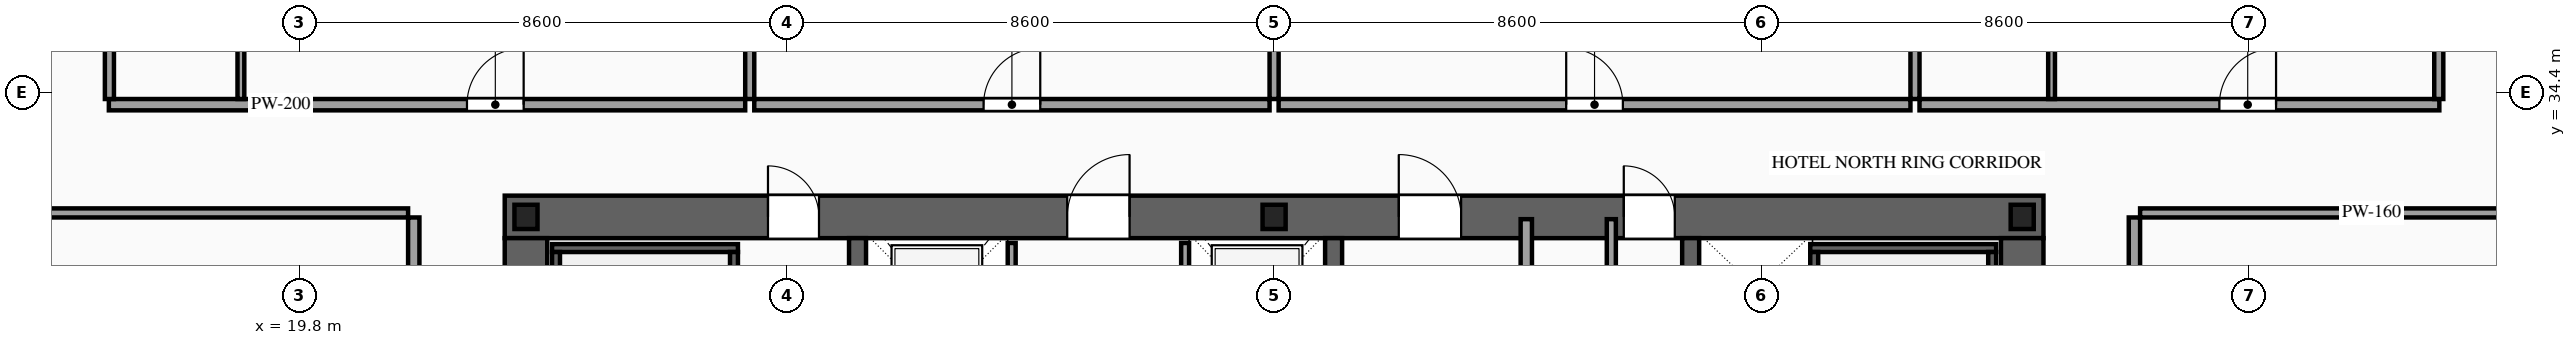
"""IFC4 building model, lengths in metres.
Left out: names, types, materials, properties, quantities, classifications, styles, units other than length and angle.
Written with IfcOpenShell. Run it as: python <this file> out.ifc"""

import sys

from ifc_helpers import new_model, si_unit, direction, frame, frame_2d, origin, origin_2d, place, context, subcontext, project, spatial, rectangle, i_section, extrude, source, transform, mapped, element, fill, save


model = new_model("IFC4")
c1 = context("Model", 3, precision=1e-05, world=origin(), true_north=direction((0.0, 1.0)))
c2 = subcontext(c1, "Body", "Model", "MODEL_VIEW")
j1 = project(units=[si_unit("LENGTHUNIT", "METRE"), si_unit("PLANEANGLEUNIT", "RADIAN")], contexts=[c1])
p1 = place(None, origin())
s1 = spatial("IfcSite", under=j1, at=p1, CompositionType="ELEMENT")
p2 = place(p1, origin())
s2 = spatial("IfcBuilding", under=s1, at=p2, CompositionType="ELEMENT")
p3 = place(p2, frame((0.0, 0.0, 101.0)))
s3 = spatial("IfcBuildingStorey", under=s2, at=p3, CompositionType="ELEMENT", Elevation=101.0)
p4 = place(p3, frame((23.425, 32.2, 0.0), z_axis=(0.0, 0.0, 1.0), x_axis=(1.0, 0.0, 0.0)))
e1 = element("IfcWall", 1, at=p4, inside=s3, PredefinedType="SHEAR", context=c2, shape_type="SweptSolid", body=[
    extrude(rectangle(XDim=27.15, YDim=0.75, at=frame_2d((13.575, 0.0))), origin(), (0.0, 0.0, 1.0), 3.6),
])
p5 = place(p4, frame((4.645, 0.0, 0.0)))
e2 = element("IfcOpeningElement", 2, at=p5, cuts=e1, PredefinedType="OPENING", context=c2, shape_type="SweptSolid", body=[
    extrude(rectangle(XDim=0.9, YDim=2.15, at=frame_2d((0.45, 1.075))), frame((0.0, 0.39, 0.0), z_axis=(0.0, -1.0, 0.0), x_axis=(1.0, 0.0, 0.0)), (0.0, 0.0, 1.0), 0.78),
])
p6 = place(p4, frame((9.925, 0.0, 0.0)))
e3 = element("IfcOpeningElement", 3, at=p6, cuts=e1, PredefinedType="OPENING", context=c2, shape_type="SweptSolid", body=[
    extrude(rectangle(XDim=1.1, YDim=2.2, at=frame_2d((0.55, 1.1))), frame((0.0, 0.39, 0.0), z_axis=(0.0, -1.0, 0.0), x_axis=(1.0, 0.0, 0.0)), (0.0, 0.0, 1.0), 0.78),
])
p7 = place(p4, frame((15.775, 0.0, 0.0)))
e4 = element("IfcOpeningElement", 4, at=p7, cuts=e1, PredefinedType="OPENING", context=c2, shape_type="SweptSolid", body=[
    extrude(rectangle(XDim=1.1, YDim=2.2, at=frame_2d((0.55, 1.1))), frame((0.0, 0.39, 0.0), z_axis=(0.0, -1.0, 0.0), x_axis=(1.0, 0.0, 0.0)), (0.0, 0.0, 1.0), 0.78),
])
p8 = place(p4, frame((19.745, 0.0, 0.0)))
e5 = element("IfcOpeningElement", 5, at=p8, cuts=e1, PredefinedType="OPENING", context=c2, shape_type="SweptSolid", body=[
    extrude(rectangle(XDim=0.9, YDim=2.15, at=frame_2d((0.45, 1.075))), frame((0.0, 0.39, 0.0), z_axis=(0.0, -1.0, 0.0), x_axis=(1.0, 0.0, 0.0)), (0.0, 0.0, 1.0), 0.78),
])
m1 = source(origin(), c2, "Body", "SweptSolid", [
    extrude(rectangle(XDim=12.05, YDim=0.75, at=frame_2d((6.025, 0.0))), origin(), (0.0, 0.0, 1.0), 3.6),
])
for number, where, z_axis, x_axis in (
    (6, (23.8, 19.775, 0.0), (0.0, 0.0, 1.0), (0.0, 1.0, 0.0)),
    (7, (50.2, 19.775, 0.0), (0.0, 0.0, 1.0), (0.0, 1.0, 0.0)),
):
    element("IfcWall", number, at=place(p3, frame(where, z_axis=z_axis, x_axis=x_axis)), inside=s3, PredefinedType="SHEAR", context=c2, shape_type="MappedRepresentation", body=[
        mapped(m1, transform((0.0, 0.0, 0.0), scale=1.0)),
    ])
m2 = source(origin(), c2, "Body", "SweptSolid", [
    extrude(rectangle(XDim=12.05, YDim=0.3, at=frame_2d((6.025, 0.0))), origin(), (0.0, 0.0, 1.0), 3.6),
])
for number, where, z_axis, x_axis in (
    (8, (29.65, 19.775, 0.0), (0.0, 0.0, 1.0), (0.0, 1.0, 0.0)),
    (9, (38.05, 19.775, 0.0), (0.0, 0.0, 1.0), (0.0, 1.0, 0.0)),
    (10, (44.35, 19.775, 0.0), (0.0, 0.0, 1.0), (0.0, 1.0, 0.0)),
):
    element("IfcWall", number, at=place(p3, frame(where, z_axis=z_axis, x_axis=x_axis)), inside=s3, PredefinedType="SOLIDWALL", context=c2, shape_type="MappedRepresentation", body=[
        mapped(m2, transform((0.0, 0.0, 0.0), scale=1.0)),
    ])
m3 = source(origin(), c2, "Body", "SweptSolid", [
    extrude(i_section(OverallWidth=0.407, OverallDepth=0.428, WebThickness=0.02, FlangeThickness=0.035, at=origin_2d()), origin(), (0.0, 0.0, 1.0), 3.6),
])
for number, where, z_axis, x_axis in (
    (11, (23.8, 32.2, 0.0), (0.0, 0.0, 1.0), (1.0, 0.0, 0.0)),
    (12, (37.0, 32.2, 0.0), (0.0, 0.0, 1.0), (1.0, 0.0, 0.0)),
    (13, (50.2, 32.2, 0.0), (0.0, 0.0, 1.0), (1.0, 0.0, 0.0)),
):
    element("IfcColumn", number, at=place(p3, frame(where, z_axis=z_axis, x_axis=x_axis)), inside=s3, PredefinedType="COLUMN", context=c2, shape_type="MappedRepresentation", body=[
        mapped(m3, transform((0.0, 0.0, 0.0), scale=1.0)),
    ])
p9 = place(p3, frame((32.37, 29.4, 0.0), z_axis=(0.0, 0.0, 1.0), x_axis=(0.0, 1.0, 0.0)))
e14 = element("IfcWall", 14, at=p9, inside=s3, PredefinedType="SOLIDWALL", context=c2, shape_type="SweptSolid", body=[
    extrude(rectangle(XDim=2.34, YDim=0.14, at=frame_2d((1.17, 0.0))), origin(), (0.0, 0.0, 1.0), 3.38),
])
p10 = place(p9, frame((0.62, 0.0, 0.0)))
e15 = element("IfcOpeningElement", 15, at=p10, cuts=e14, PredefinedType="OPENING", context=c2, shape_type="SweptSolid", body=[
    extrude(rectangle(XDim=1.1, YDim=2.2, at=frame_2d((0.55, 1.1))), frame((0.0, 0.085, 0.0), z_axis=(0.0, -1.0, 0.0), x_axis=(1.0, 0.0, 0.0)), (0.0, 0.0, 1.0), 0.17),
])
p11 = place(p3, frame((35.43, 29.4, 0.0), z_axis=(0.0, 0.0, 1.0), x_axis=(0.0, 1.0, 0.0)))
e16 = element("IfcWall", 16, at=p11, inside=s3, PredefinedType="SOLIDWALL", context=c2, shape_type="SweptSolid", body=[
    extrude(rectangle(XDim=2.34, YDim=0.14, at=frame_2d((1.17, 0.0))), origin(), (0.0, 0.0, 1.0), 3.38),
])
p12 = place(p11, frame((0.62, 0.0, 0.0)))
e17 = element("IfcOpeningElement", 17, at=p12, cuts=e16, PredefinedType="OPENING", context=c2, shape_type="SweptSolid", body=[
    extrude(rectangle(XDim=1.1, YDim=2.2, at=frame_2d((0.55, 1.1))), frame((0.0, 0.085, 0.0), z_axis=(0.0, -1.0, 0.0), x_axis=(1.0, 0.0, 0.0)), (0.0, 0.0, 1.0), 0.17),
])
m4 = source(origin(), c2, "Body", "SweptSolid", [
    extrude(rectangle(XDim=3.28, YDim=0.14, at=frame_2d((1.64, 0.0))), origin(), (0.0, 0.0, 1.0), 3.38),
])
p13 = place(p3, frame((24.26, 31.65, 0.0), z_axis=(0.0, 0.0, 1.0), x_axis=(1.0, 0.0, 0.0)))
e18 = element("IfcWall", 18, at=p13, inside=s3, PredefinedType="SOLIDWALL", context=c2, shape_type="MappedRepresentation", body=[
    mapped(m4, transform((0.0, 0.0, 0.0), scale=1.0)),
])
m5 = source(origin(), c2, "Body", "SweptSolid", [
    extrude(rectangle(XDim=8.94, YDim=0.14, at=frame_2d((4.47, 0.0))), origin(), (0.0, 0.0, 1.0), 3.38),
])
for number, where, z_axis, x_axis in (
    (19, (24.33, 22.64, 0.0), (0.0, 0.0, 1.0), (0.0, 1.0, 0.0)),
    (20, (27.47, 22.64, 0.0), (0.0, 0.0, 1.0), (0.0, 1.0, 0.0)),
):
    element("IfcWall", number, at=place(p3, frame(where, z_axis=z_axis, x_axis=x_axis)), inside=s3, PredefinedType="SOLIDWALL", context=c2, shape_type="MappedRepresentation", body=[
        mapped(m5, transform((0.0, 0.0, 0.0), scale=1.0)),
    ])
p14 = place(p3, frame((46.46, 31.65, 0.0), z_axis=(0.0, 0.0, 1.0), x_axis=(1.0, 0.0, 0.0)))
e21 = element("IfcWall", 21, at=p14, inside=s3, PredefinedType="SOLIDWALL", context=c2, shape_type="MappedRepresentation", body=[
    mapped(m4, transform((0.0, 0.0, 0.0), scale=1.0)),
])
for number, where, z_axis, x_axis in (
    (22, (46.53, 22.64, 0.0), (0.0, 0.0, 1.0), (0.0, 1.0, 0.0)),
    (23, (49.67, 22.64, 0.0), (0.0, 0.0, 1.0), (0.0, 1.0, 0.0)),
):
    element("IfcWall", number, at=place(p3, frame(where, z_axis=z_axis, x_axis=x_axis)), inside=s3, PredefinedType="SOLIDWALL", context=c2, shape_type="MappedRepresentation", body=[
        mapped(m5, transform((0.0, 0.0, 0.0), scale=1.0)),
    ])
m6 = source(origin(), c2, "Body", "SweptSolid", [
    extrude(rectangle(XDim=12.72, YDim=0.2, at=frame_2d((6.36, 0.0))), origin(), (0.0, 0.0, 1.0), 3.38),
])
p15 = place(p3, frame((41.45, 19.44, 0.0), z_axis=(0.0, 0.0, 1.0), x_axis=(0.0, 1.0, 0.0)))
e24 = element("IfcWall", 24, at=p15, inside=s3, PredefinedType="PARTITIONING", context=c2, shape_type="MappedRepresentation", body=[
    mapped(m6, transform((0.0, 0.0, 0.0), scale=1.0)),
])
m7 = source(origin(), c2, "Body", "SweptSolid", [
    extrude(rectangle(XDim=10.72, YDim=0.16, at=frame_2d((5.36, 0.0))), origin(), (0.0, 0.0, 1.0), 3.38),
])
p16 = place(p3, frame((42.95, 21.44, 0.0), z_axis=(0.0, 0.0, 1.0), x_axis=(0.0, 1.0, 0.0)))
e25 = element("IfcWall", 25, at=p16, inside=s3, PredefinedType="PARTITIONING", context=c2, shape_type="MappedRepresentation", body=[
    mapped(m7, transform((0.0, 0.0, 0.0), scale=1.0)),
])
p17 = place(p3, frame((16.44, 34.18, 0.0), z_axis=(0.0, 0.0, 1.0), x_axis=(1.0, 0.0, 0.0)))
e26 = element("IfcWall", 26, at=p17, inside=s3, PredefinedType="PARTITIONING", context=c2, shape_type="SweptSolid", body=[
    extrude(rectangle(XDim=11.228, YDim=0.2, at=frame_2d((5.614, 0.0))), origin(), (0.0, 0.0, 1.0), 3.38),
])
p18 = place(p17, frame((6.319, 0.0, 0.0)))
e27 = element("IfcOpeningElement", 27, at=p18, cuts=e26, PredefinedType="OPENING", context=c2, shape_type="SweptSolid", body=[
    extrude(rectangle(XDim=1.0, YDim=2.2, at=frame_2d((0.5, 1.1))), frame((0.0, 0.115, 0.0), z_axis=(0.0, -1.0, 0.0), x_axis=(1.0, 0.0, 0.0)), (0.0, 0.0, 1.0), 0.23),
])
m8 = source(origin(), c2, "Body", "SweptSolid", [
    extrude(rectangle(XDim=14.97, YDim=0.16, at=frame_2d((7.485, 0.0))), origin(), (0.0, 0.0, 1.0), 3.38),
])
p19 = place(p3, frame((27.748, 34.28, 0.0), z_axis=(0.0, 0.0, 1.0), x_axis=(0.0, 1.0, 0.0)))
e28 = element("IfcWall", 28, at=p19, inside=s3, PredefinedType="PARTITIONING", context=c2, shape_type="MappedRepresentation", body=[
    mapped(m8, transform((0.0, 0.0, 0.0), scale=1.0)),
])
m9 = source(origin(), c2, "Body", "SweptSolid", [
    extrude(rectangle(XDim=2.42, YDim=0.12, at=frame_2d((1.21, 0.0))), origin(), (0.0, 0.0, 1.0), 3.38),
])
p20 = place(p3, frame((18.77, 34.28, 0.0), z_axis=(0.0, 0.0, 1.0), x_axis=(0.0, 1.0, 0.0)))
e29 = element("IfcWall", 29, at=p20, inside=s3, PredefinedType="PARTITIONING", context=c2, shape_type="MappedRepresentation", body=[
    mapped(m9, transform((0.0, 0.0, 0.0), scale=1.0)),
])
p21 = place(p3, frame((27.828, 34.18, 0.0), z_axis=(0.0, 0.0, 1.0), x_axis=(1.0, 0.0, 0.0)))
e30 = element("IfcWall", 30, at=p21, inside=s3, PredefinedType="PARTITIONING", context=c2, shape_type="SweptSolid", body=[
    extrude(rectangle(XDim=9.092, YDim=0.2, at=frame_2d((4.546, 0.0))), origin(), (0.0, 0.0, 1.0), 3.38),
])
p22 = place(p21, frame((4.046, 0.0, 0.0)))
e31 = element("IfcOpeningElement", 31, at=p22, cuts=e30, PredefinedType="OPENING", context=c2, shape_type="SweptSolid", body=[
    extrude(rectangle(XDim=1.0, YDim=2.2, at=frame_2d((0.5, 1.1))), frame((0.0, 0.115, 0.0), z_axis=(0.0, -1.0, 0.0), x_axis=(1.0, 0.0, 0.0)), (0.0, 0.0, 1.0), 0.23),
])
m10 = source(origin(), c2, "Body", "SweptSolid", [
    extrude(rectangle(XDim=14.97, YDim=0.16, at=frame_2d((7.485, 0.0))), origin(), (0.0, 0.0, 1.0), 2.675),
])
p23 = place(p3, frame((37.0, 34.28, 0.0), z_axis=(0.0, 0.0, 1.0), x_axis=(0.0, 1.0, 0.0)))
e32 = element("IfcWall", 32, at=p23, inside=s3, PredefinedType="PARTITIONING", context=c2, shape_type="MappedRepresentation", body=[
    mapped(m10, transform((0.0, 0.0, 0.0), scale=1.0)),
])
p24 = place(p3, frame((37.08, 34.18, 0.0), z_axis=(0.0, 0.0, 1.0), x_axis=(1.0, 0.0, 0.0)))
e33 = element("IfcWall", 33, at=p24, inside=s3, PredefinedType="PARTITIONING", context=c2, shape_type="SweptSolid", body=[
    extrude(rectangle(XDim=11.148, YDim=0.2, at=frame_2d((5.574, 0.0))), origin(), (0.0, 0.0, 1.0), 3.38),
])
p25 = place(p24, frame((5.074, 0.0, 0.0)))
e34 = element("IfcOpeningElement", 34, at=p25, cuts=e33, PredefinedType="OPENING", context=c2, shape_type="SweptSolid", body=[
    extrude(rectangle(XDim=1.0, YDim=2.2, at=frame_2d((0.5, 1.1))), frame((0.0, 0.115, 0.0), z_axis=(0.0, -1.0, 0.0), x_axis=(1.0, 0.0, 0.0)), (0.0, 0.0, 1.0), 0.23),
])
p26 = place(p3, frame((48.308, 34.28, 0.0), z_axis=(0.0, 0.0, 1.0), x_axis=(0.0, 1.0, 0.0)))
e35 = element("IfcWall", 35, at=p26, inside=s3, PredefinedType="PARTITIONING", context=c2, shape_type="MappedRepresentation", body=[
    mapped(m8, transform((0.0, 0.0, 0.0), scale=1.0)),
])
p27 = place(p3, frame((48.388, 34.18, 0.0), z_axis=(0.0, 0.0, 1.0), x_axis=(1.0, 0.0, 0.0)))
e36 = element("IfcWall", 36, at=p27, inside=s3, PredefinedType="PARTITIONING", context=c2, shape_type="SweptSolid", body=[
    extrude(rectangle(XDim=9.172, YDim=0.2, at=frame_2d((4.586, 0.0))), origin(), (0.0, 0.0, 1.0), 3.38),
])
p28 = place(p27, frame((5.291, 0.0, 0.0)))
e37 = element("IfcOpeningElement", 37, at=p28, cuts=e36, PredefinedType="OPENING", context=c2, shape_type="SweptSolid", body=[
    extrude(rectangle(XDim=1.0, YDim=2.2, at=frame_2d((0.5, 1.1))), frame((0.0, 0.115, 0.0), z_axis=(0.0, -1.0, 0.0), x_axis=(1.0, 0.0, 0.0)), (0.0, 0.0, 1.0), 0.23),
])
m11 = source(origin(), c2, "Body", "SweptSolid", [
    extrude(rectangle(XDim=14.82, YDim=0.16, at=frame_2d((7.41, 0.0))), origin(), (0.0, 0.0, 1.0), 3.38),
])
for number, where, z_axis, x_axis in (
    (38, (16.45, 34.28, 0.0), (0.0, 0.0, 1.0), (0.0, 1.0, 0.0)),
    (39, (57.55, 34.28, 0.0), (0.0, 0.0, 1.0), (0.0, 1.0, 0.0)),
):
    element("IfcWall", number, at=place(p3, frame(where, z_axis=z_axis, x_axis=x_axis)), inside=s3, PredefinedType="PARTITIONING", context=c2, shape_type="MappedRepresentation", body=[
        mapped(m11, transform((0.0, 0.0, 0.0), scale=1.0)),
    ])
p29 = place(p3, frame((50.718, 34.28, 0.0), z_axis=(0.0, 0.0, 1.0), x_axis=(0.0, 1.0, 0.0)))
e40 = element("IfcWall", 40, at=p29, inside=s3, PredefinedType="PARTITIONING", context=c2, shape_type="MappedRepresentation", body=[
    mapped(m9, transform((0.0, 0.0, 0.0), scale=1.0)),
])
p30 = place(p3, frame((21.82, 19.41, 0.0), z_axis=(0.0, 0.0, 1.0), x_axis=(0.0, 1.0, 0.0)))
e41 = element("IfcWall", 41, at=p30, inside=s3, PredefinedType="PARTITIONING", context=c2, shape_type="SweptSolid", body=[
    extrude(rectangle(XDim=12.78, YDim=0.2, at=frame_2d((6.39, 0.0))), origin(), (0.0, 0.0, 1.0), 3.38),
])
p31 = place(p30, frame((5.89, 0.0, 0.0)))
e42 = element("IfcOpeningElement", 42, at=p31, cuts=e41, PredefinedType="OPENING", context=c2, shape_type="SweptSolid", body=[
    extrude(rectangle(XDim=1.0, YDim=2.2, at=frame_2d((0.5, 1.1))), frame((0.0, 0.115, 0.0), z_axis=(0.0, -1.0, 0.0), x_axis=(1.0, 0.0, 0.0)), (0.0, 0.0, 1.0), 0.23),
])
m12 = source(origin(), c2, "Body", "SweptSolid", [
    extrude(rectangle(XDim=8.17, YDim=0.16, at=frame_2d((4.085, 0.0))), origin(), (0.0, 0.0, 1.0), 2.875),
])
p32 = place(p3, frame((13.55, 32.27, 0.0), z_axis=(0.0, 0.0, 1.0), x_axis=(1.0, 0.0, 0.0)))
e43 = element("IfcWall", 43, at=p32, inside=s3, PredefinedType="PARTITIONING", context=c2, shape_type="MappedRepresentation", body=[
    mapped(m12, transform((0.0, 0.0, 0.0), scale=1.0)),
])
p33 = place(p3, frame((52.18, 19.41, 0.0), z_axis=(0.0, 0.0, 1.0), x_axis=(0.0, 1.0, 0.0)))
e44 = element("IfcWall", 44, at=p33, inside=s3, PredefinedType="PARTITIONING", context=c2, shape_type="SweptSolid", body=[
    extrude(rectangle(XDim=12.78, YDim=0.2, at=frame_2d((6.39, 0.0))), origin(), (0.0, 0.0, 1.0), 3.38),
])
p34 = place(p33, frame((5.89, 0.0, 0.0)))
e45 = element("IfcOpeningElement", 45, at=p34, cuts=e44, PredefinedType="OPENING", context=c2, shape_type="SweptSolid", body=[
    extrude(rectangle(XDim=1.0, YDim=2.2, at=frame_2d((0.5, 1.1))), frame((0.0, 0.115, 0.0), z_axis=(0.0, -1.0, 0.0), x_axis=(1.0, 0.0, 0.0)), (0.0, 0.0, 1.0), 0.23),
])
p35 = place(p3, frame((52.28, 32.27, 0.0), z_axis=(0.0, 0.0, 1.0), x_axis=(1.0, 0.0, 0.0)))
e46 = element("IfcWall", 46, at=p35, inside=s3, PredefinedType="PARTITIONING", context=c2, shape_type="MappedRepresentation", body=[
    mapped(m12, transform((0.0, 0.0, 0.0), scale=1.0)),
])
m13 = source(origin(), c2, "Body", "SweptSolid", [
    extrude(rectangle(XDim=0.9, YDim=2.15, at=frame_2d((0.45, 1.075))), frame((0.0, 0.025, 0.0), z_axis=(0.0, -1.0, 0.0), x_axis=(1.0, 0.0, 0.0)), (0.0, 0.0, 1.0), 0.05),
])
p36 = place(p5, origin())
e47 = element("IfcDoor", 47, at=p36, inside=s3, OperationType="SINGLE_SWING_LEFT", PredefinedType="DOOR", context=c2, shape_type="MappedRepresentation", body=[
    mapped(m13, transform((0.0, 0.0, 0.0), scale=1.0)),
])
fill(e2, e47)
m14 = source(origin(), c2, "Body", "SweptSolid", [
    extrude(rectangle(XDim=1.1, YDim=2.2, at=frame_2d((0.55, 1.1))), frame((0.0, 0.025, 0.0), z_axis=(0.0, -1.0, 0.0), x_axis=(1.0, 0.0, 0.0)), (0.0, 0.0, 1.0), 0.05),
])
p37 = place(p6, origin())
e48 = element("IfcDoor", 48, at=p37, inside=s3, OperationType="SINGLE_SWING_RIGHT", PredefinedType="DOOR", context=c2, shape_type="MappedRepresentation", body=[
    mapped(m14, transform((0.0, 0.0, 0.0), scale=1.0)),
])
fill(e3, e48)
p38 = place(p7, origin())
e49 = element("IfcDoor", 49, at=p38, inside=s3, OperationType="SINGLE_SWING_LEFT", PredefinedType="DOOR", context=c2, shape_type="MappedRepresentation", body=[
    mapped(m14, transform((0.0, 0.0, 0.0), scale=1.0)),
])
fill(e4, e49)
p39 = place(p8, origin())
e50 = element("IfcDoor", 50, at=p39, inside=s3, OperationType="SINGLE_SWING_LEFT", PredefinedType="DOOR", context=c2, shape_type="MappedRepresentation", body=[
    mapped(m13, transform((0.0, 0.0, 0.0), scale=1.0)),
])
fill(e5, e50)
m15 = source(origin(), c2, "Body", "SweptSolid", [
    extrude(rectangle(XDim=1.0, YDim=2.2, at=frame_2d((0.5, 1.1))), frame((0.0, 0.025, 0.0), z_axis=(0.0, -1.0, 0.0), x_axis=(1.0, 0.0, 0.0)), (0.0, 0.0, 1.0), 0.05),
])
p40 = place(p18, origin())
e51 = element("IfcDoor", 51, at=p40, inside=s3, OperationType="SINGLE_SWING_RIGHT", PredefinedType="DOOR", context=c2, shape_type="MappedRepresentation", body=[
    mapped(m15, transform((0.0, 0.0, 0.0), scale=1.0)),
])
fill(e27, e51)
p41 = place(p22, origin())
e52 = element("IfcDoor", 52, at=p41, inside=s3, OperationType="SINGLE_SWING_RIGHT", PredefinedType="DOOR", context=c2, shape_type="MappedRepresentation", body=[
    mapped(m15, transform((0.0, 0.0, 0.0), scale=1.0)),
])
fill(e31, e52)
p42 = place(p25, origin())
e53 = element("IfcDoor", 53, at=p42, inside=s3, OperationType="SINGLE_SWING_LEFT", PredefinedType="DOOR", context=c2, shape_type="MappedRepresentation", body=[
    mapped(m15, transform((0.0, 0.0, 0.0), scale=1.0)),
])
fill(e34, e53)
p43 = place(p28, origin())
e54 = element("IfcDoor", 54, at=p43, inside=s3, OperationType="SINGLE_SWING_RIGHT", PredefinedType="DOOR", context=c2, shape_type="MappedRepresentation", body=[
    mapped(m15, transform((0.0, 0.0, 0.0), scale=1.0)),
])
fill(e37, e54)
save(model, sys.argv[1])
